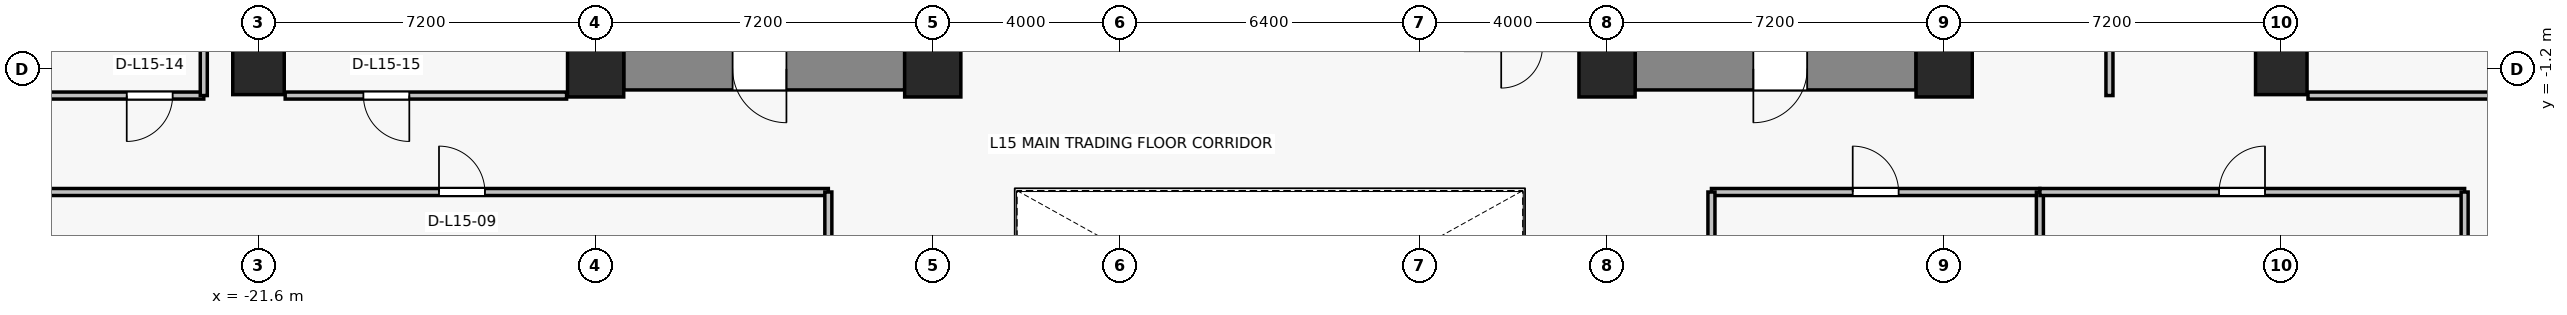
"""IFC4 building model, lengths in metres.
Left out: names, types, materials, properties, quantities, classifications, styles, units other than length and angle.
Written with IfcOpenShell. Run it as: python <this file> out.ifc"""

import sys

from ifc_helpers import new_model, si_unit, direction, frame, frame_2d, origin, origin_2d, place, context, subcontext, project, spatial, rectangle, extrude, source, transform, mapped, element, fill, save


model = new_model("IFC4")
c1 = context("Model", 3, precision=1e-05, world=origin(), true_north=direction((0.0, 1.0)))
c2 = subcontext(c1, "Body", "Model", "MODEL_VIEW")
j1 = project(units=[si_unit("LENGTHUNIT", "METRE"), si_unit("PLANEANGLEUNIT", "RADIAN")], contexts=[c1])
p1 = place(None, origin())
s1 = spatial("IfcSite", under=j1, at=p1, CompositionType="ELEMENT")
p2 = place(p1, origin())
s2 = spatial("IfcBuilding", under=s1, at=p2, CompositionType="ELEMENT")
p3 = place(p2, frame((0.0, 0.0, 57.1)))
s3 = spatial("IfcBuildingStorey", under=s2, at=p3, CompositionType="ELEMENT", Elevation=57.1)
for number, where, z_axis, x_axis in (
    (1, (-14.4, -1.2, 0.0), (0.0, 0.0, 1.0), (1.0, 0.0, 0.0)),
    (2, (-7.2, -1.2, 0.0), (0.0, 0.0, 1.0), (1.0, 0.0, 0.0)),
    (3, (7.2, -1.2, 0.0), (0.0, 0.0, 1.0), (1.0, 0.0, 0.0)),
    (4, (14.4, -1.2, 0.0), (0.0, 0.0, 1.0), (1.0, 0.0, 0.0)),
):
    element("IfcColumn", number, at=place(p3, frame(where, z_axis=z_axis, x_axis=x_axis)), inside=s3, PredefinedType="COLUMN", context=c2, shape_type="SweptSolid", body=[
        extrude(rectangle(XDim=1.2, YDim=1.2, at=origin_2d()), origin(), (0.0, 0.0, 1.0), 3.3),
    ])
for number, where, z_axis, x_axis in (
    (5, (-21.6, -1.2, 0.0), (0.0, 0.0, 1.0), (1.0, 0.0, 0.0)),
    (6, (21.6, -1.2, 0.0), (0.0, 0.0, 1.0), (1.0, 0.0, 0.0)),
):
    element("IfcColumn", number, at=place(p3, frame(where, z_axis=z_axis, x_axis=x_axis)), inside=s3, PredefinedType="COLUMN", context=c2, shape_type="SweptSolid", body=[
        extrude(rectangle(XDim=1.1, YDim=1.1, at=origin_2d()), origin(), (0.0, 0.0, 1.0), 3.3),
    ])
p4 = place(p3, frame((-7.8, -1.2, 0.0), z_axis=(0.0, 0.0, 1.0), x_axis=(-1.0, 0.0, 0.0)))
e7 = element("IfcWall", 7, at=p4, inside=s3, PredefinedType="SHEAR", context=c2, shape_type="SweptSolid", body=[
    extrude(rectangle(XDim=6.0, YDim=0.9, at=frame_2d((3.0, 0.0))), origin(), (0.0, 0.0, 1.0), 3.075),
])
p5 = place(p4, frame((2.525, 0.0, 0.0)))
e8 = element("IfcOpeningElement", 8, at=p5, cuts=e7, PredefinedType="OPENING", context=c2, shape_type="SweptSolid", body=[
    extrude(rectangle(XDim=1.15, YDim=2.15, at=frame_2d((0.575, 1.075))), frame((0.0, 0.46, 0.0), z_axis=(0.0, -1.0, 0.0), x_axis=(1.0, 0.0, 0.0)), (0.0, 0.0, 1.0), 0.92),
])
p6 = place(p3, frame((13.8, -1.2, 0.0), z_axis=(0.0, 0.0, 1.0), x_axis=(-1.0, 0.0, 0.0)))
e9 = element("IfcWall", 9, at=p6, inside=s3, PredefinedType="SHEAR", context=c2, shape_type="SweptSolid", body=[
    extrude(rectangle(XDim=6.0, YDim=0.9, at=frame_2d((3.0, 0.0))), origin(), (0.0, 0.0, 1.0), 3.075),
])
p7 = place(p6, frame((2.325, 0.0, 0.0)))
e10 = element("IfcOpeningElement", 10, at=p7, cuts=e9, PredefinedType="OPENING", context=c2, shape_type="SweptSolid", body=[
    extrude(rectangle(XDim=1.15, YDim=2.15, at=frame_2d((0.575, 1.075))), frame((0.0, 0.46, 0.0), z_axis=(0.0, -1.0, 0.0), x_axis=(1.0, 0.0, 0.0)), (0.0, 0.0, 1.0), 0.92),
])
p8 = place(p3, frame((-28.53, -3.83, 0.0), z_axis=(0.0, 0.0, 1.0), x_axis=(1.0, 0.0, 0.0)))
e11 = element("IfcWall", 11, at=p8, inside=s3, PredefinedType="PARTITIONING", context=c2, shape_type="SweptSolid", body=[
    extrude(rectangle(XDim=19.1, YDim=0.15, at=frame_2d((9.55, 0.0))), origin(), (0.0, 0.0, 1.0), 2.465),
])
p9 = place(p8, frame((10.785, 0.0, 0.0)))
e12 = element("IfcOpeningElement", 12, at=p9, cuts=e11, PredefinedType="OPENING", context=c2, shape_type="SweptSolid", body=[
    extrude(rectangle(XDim=0.98, YDim=2.15, at=frame_2d((0.49, 1.075))), frame((0.0, 0.085, 0.0), z_axis=(0.0, -1.0, 0.0), x_axis=(1.0, 0.0, 0.0)), (0.0, 0.0, 1.0), 0.17),
])
p10 = place(p3, frame((-9.43, -3.83, 0.0), z_axis=(0.0, 0.0, 1.0), x_axis=(0.0, -1.0, 0.0)))
e13 = element("IfcWall", 13, at=p10, inside=s3, PredefinedType="PARTITIONING", context=c2, shape_type="SweptSolid", body=[
    extrude(rectangle(XDim=8.49, YDim=0.15, at=frame_2d((4.245, 0.0))), origin(), (0.0, 0.0, 1.0), 2.465),
])
p11 = place(p3, frame((9.43, -3.83, 0.0), z_axis=(0.0, 0.0, 1.0), x_axis=(1.0, 0.0, 0.0)))
e14 = element("IfcWall", 14, at=p11, inside=s3, PredefinedType="PARTITIONING", context=c2, shape_type="SweptSolid", body=[
    extrude(rectangle(XDim=7.015, YDim=0.15, at=frame_2d((3.507, 0.0))), origin(), (0.0, 0.0, 1.0), 2.465),
])
p12 = place(p11, frame((3.017, 0.0, 0.0)))
e15 = element("IfcOpeningElement", 15, at=p12, cuts=e14, PredefinedType="OPENING", context=c2, shape_type="SweptSolid", body=[
    extrude(rectangle(XDim=0.98, YDim=2.15, at=frame_2d((0.49, 1.075))), frame((0.0, 0.085, 0.0), z_axis=(0.0, -1.0, 0.0), x_axis=(1.0, 0.0, 0.0)), (0.0, 0.0, 1.0), 0.17),
])
for number, where, z_axis, x_axis in (
    (16, (9.43, -12.32, 0.0), (0.0, 0.0, 1.0), (0.0, 1.0, 0.0)),
    (17, (16.445, -3.83, 0.0), (0.0, 0.0, 1.0), (0.0, -1.0, 0.0)),
):
    element("IfcWall", number, at=place(p3, frame(where, z_axis=z_axis, x_axis=x_axis)), inside=s3, PredefinedType="PARTITIONING", context=c2, shape_type="SweptSolid", body=[
        extrude(rectangle(XDim=8.49, YDim=0.15, at=frame_2d((4.245, 0.0))), origin(), (0.0, 0.0, 1.0), 2.465),
    ])
p13 = place(p3, frame((16.445, -3.83, 0.0), z_axis=(0.0, 0.0, 1.0), x_axis=(1.0, 0.0, 0.0)))
e18 = element("IfcWall", 18, at=p13, inside=s3, PredefinedType="PARTITIONING", context=c2, shape_type="SweptSolid", body=[
    extrude(rectangle(XDim=9.071, YDim=0.15, at=frame_2d((4.535, 0.0))), origin(), (0.0, 0.0, 1.0), 2.465),
])
p14 = place(p13, frame((3.827, 0.0, 0.0)))
e19 = element("IfcOpeningElement", 19, at=p14, cuts=e18, PredefinedType="OPENING", context=c2, shape_type="SweptSolid", body=[
    extrude(rectangle(XDim=0.98, YDim=2.15, at=frame_2d((0.49, 1.075))), frame((0.0, 0.085, 0.0), z_axis=(0.0, -1.0, 0.0), x_axis=(1.0, 0.0, 0.0)), (0.0, 0.0, 1.0), 0.17),
])
p15 = place(p3, frame((25.515, -3.83, 0.0), z_axis=(0.0, 0.0, 1.0), x_axis=(0.0, -1.0, 0.0)))
e20 = element("IfcWall", 20, at=p15, inside=s3, PredefinedType="PARTITIONING", context=c2, shape_type="SweptSolid", body=[
    extrude(rectangle(XDim=8.49, YDim=0.15, at=frame_2d((4.245, 0.0))), origin(), (0.0, 0.0, 1.0), 2.465),
])
p16 = place(p3, frame((-22.769, -1.77, 0.0), z_axis=(0.0, 0.0, 1.0), x_axis=(-1.0, 0.0, 0.0)))
e21 = element("IfcWall", 21, at=p16, inside=s3, PredefinedType="PARTITIONING", context=c2, shape_type="SweptSolid", body=[
    extrude(rectangle(XDim=5.761, YDim=0.15, at=frame_2d((2.881, 0.0))), origin(), (0.0, 0.0, 1.0), 2.465),
])
p17 = place(p16, frame((0.666, 0.0, 0.0)))
e22 = element("IfcOpeningElement", 22, at=p17, cuts=e21, PredefinedType="OPENING", context=c2, shape_type="SweptSolid", body=[
    extrude(rectangle(XDim=0.98, YDim=2.15, at=frame_2d((0.49, 1.075))), frame((0.0, 0.085, 0.0), z_axis=(0.0, -1.0, 0.0), x_axis=(1.0, 0.0, 0.0)), (0.0, 0.0, 1.0), 0.17),
])
p18 = place(p3, frame((-22.769, 13.88, 0.0), z_axis=(0.0, 0.0, 1.0), x_axis=(0.0, -1.0, 0.0)))
e23 = element("IfcWall", 23, at=p18, inside=s3, PredefinedType="PARTITIONING", context=c2, shape_type="SweptSolid", body=[
    extrude(rectangle(XDim=15.65, YDim=0.15, at=frame_2d((7.825, 0.0))), origin(), (0.0, 0.0, 1.0), 2.465),
])
p19 = place(p3, frame((-15.02, -1.77, 0.0), z_axis=(0.0, 0.0, 1.0), x_axis=(-1.0, 0.0, 0.0)))
e24 = element("IfcWall", 24, at=p19, inside=s3, PredefinedType="PARTITIONING", context=c2, shape_type="SweptSolid", body=[
    extrude(rectangle(XDim=6.01, YDim=0.15, at=frame_2d((3.005, 0.0))), origin(), (0.0, 0.0, 1.0), 3.075),
])
p20 = place(p19, frame((3.359, 0.0, 0.0)))
e25 = element("IfcOpeningElement", 25, at=p20, cuts=e24, PredefinedType="OPENING", context=c2, shape_type="SweptSolid", body=[
    extrude(rectangle(XDim=0.98, YDim=2.15, at=frame_2d((0.49, 1.075))), frame((0.0, 0.085, 0.0), z_axis=(0.0, -1.0, 0.0), x_axis=(1.0, 0.0, 0.0)), (0.0, 0.0, 1.0), 0.17),
])
p21 = place(p3, frame((32.53, -1.77, 0.0), z_axis=(0.0, 0.0, 1.0), x_axis=(-1.0, 0.0, 0.0)))
e26 = element("IfcWall", 26, at=p21, inside=s3, PredefinedType="PARTITIONING", context=c2, shape_type="SweptSolid", body=[
    extrude(rectangle(XDim=10.36, YDim=0.15, at=frame_2d((5.18, 0.0))), origin(), (0.0, 0.0, 1.0), 2.465),
])
p22 = place(p3, frame((17.93, -1.77, 0.0), z_axis=(0.0, 0.0, 1.0), x_axis=(0.0, 1.0, 0.0)))
e27 = element("IfcWall", 27, at=p22, inside=s3, PredefinedType="PARTITIONING", context=c2, shape_type="SweptSolid", body=[
    extrude(rectangle(XDim=15.65, YDim=0.15, at=frame_2d((7.825, 0.0))), origin(), (0.0, 0.0, 1.0), 2.465),
])
p23 = place(p22, frame((7.335, 0.0, 0.0)))
e28 = element("IfcOpeningElement", 28, at=p23, cuts=e27, PredefinedType="OPENING", context=c2, shape_type="SweptSolid", body=[
    extrude(rectangle(XDim=0.98, YDim=2.15, at=frame_2d((0.49, 1.075))), frame((0.0, 0.085, 0.0), z_axis=(0.0, -1.0, 0.0), x_axis=(1.0, 0.0, 0.0)), (0.0, 0.0, 1.0), 0.17),
])
m1 = source(origin(), c2, "Body", "SweptSolid", [
    extrude(rectangle(XDim=1.15, YDim=2.15, at=frame_2d((0.575, 1.075))), frame((0.0, 0.025, 0.0), z_axis=(0.0, -1.0, 0.0), x_axis=(1.0, 0.0, 0.0)), (0.0, 0.0, 1.0), 0.05),
])
p24 = place(p5, origin())
e29 = element("IfcDoor", 29, at=p24, inside=s3, OperationType="SINGLE_SWING_LEFT", PredefinedType="DOOR", context=c2, shape_type="MappedRepresentation", body=[
    mapped(m1, transform((0.0, 0.0, 0.0), x_axis=(1.0, 0.0, 0.0), y_axis=(0.0, 1.0, 0.0), z_axis=(0.0, 0.0, 1.0), scale=1.0)),
])
fill(e8, e29)
p25 = place(p7, origin())
e30 = element("IfcDoor", 30, at=p25, inside=s3, OperationType="SINGLE_SWING_RIGHT", PredefinedType="DOOR", context=c2, shape_type="MappedRepresentation", body=[
    mapped(m1, transform((0.0, 0.0, 0.0), x_axis=(1.0, 0.0, 0.0), y_axis=(0.0, 1.0, 0.0), z_axis=(0.0, 0.0, 1.0), scale=1.0)),
])
fill(e10, e30)
m2 = source(origin(), c2, "Body", "SweptSolid", [
    extrude(rectangle(XDim=0.98, YDim=2.15, at=frame_2d((0.49, 1.075))), frame((0.0, 0.025, 0.0), z_axis=(0.0, -1.0, 0.0), x_axis=(1.0, 0.0, 0.0)), (0.0, 0.0, 1.0), 0.05),
])
p26 = place(p9, origin())
e31 = element("IfcDoor", 31, at=p26, inside=s3, OperationType="SINGLE_SWING_LEFT", PredefinedType="DOOR", context=c2, shape_type="MappedRepresentation", body=[
    mapped(m2, transform((0.0, 0.0, 0.0), x_axis=(1.0, 0.0, 0.0), y_axis=(0.0, 1.0, 0.0), z_axis=(0.0, 0.0, 1.0), scale=1.0)),
])
fill(e12, e31)
p27 = place(p12, origin())
e32 = element("IfcDoor", 32, at=p27, inside=s3, OperationType="SINGLE_SWING_LEFT", PredefinedType="DOOR", context=c2, shape_type="MappedRepresentation", body=[
    mapped(m2, transform((0.0, 0.0, 0.0), x_axis=(1.0, 0.0, 0.0), y_axis=(0.0, 1.0, 0.0), z_axis=(0.0, 0.0, 1.0), scale=1.0)),
])
fill(e15, e32)
p28 = place(p14, origin())
e33 = element("IfcDoor", 33, at=p28, inside=s3, OperationType="SINGLE_SWING_RIGHT", PredefinedType="DOOR", context=c2, shape_type="MappedRepresentation", body=[
    mapped(m2, transform((0.0, 0.0, 0.0), x_axis=(1.0, 0.0, 0.0), y_axis=(0.0, 1.0, 0.0), z_axis=(0.0, 0.0, 1.0), scale=1.0)),
])
fill(e19, e33)
p29 = place(p17, origin())
e34 = element("IfcDoor", 34, at=p29, inside=s3, OperationType="SINGLE_SWING_RIGHT", PredefinedType="DOOR", context=c2, shape_type="MappedRepresentation", body=[
    mapped(m2, transform((0.0, 0.0, 0.0), x_axis=(1.0, 0.0, 0.0), y_axis=(0.0, 1.0, 0.0), z_axis=(0.0, 0.0, 1.0), scale=1.0)),
])
fill(e22, e34)
p30 = place(p20, origin())
e35 = element("IfcDoor", 35, at=p30, inside=s3, OperationType="SINGLE_SWING_LEFT", PredefinedType="DOOR", context=c2, shape_type="MappedRepresentation", body=[
    mapped(m2, transform((0.0, 0.0, 0.0), x_axis=(1.0, 0.0, 0.0), y_axis=(0.0, 1.0, 0.0), z_axis=(0.0, 0.0, 1.0), scale=1.0)),
])
fill(e25, e35)
save(model, sys.argv[1])
